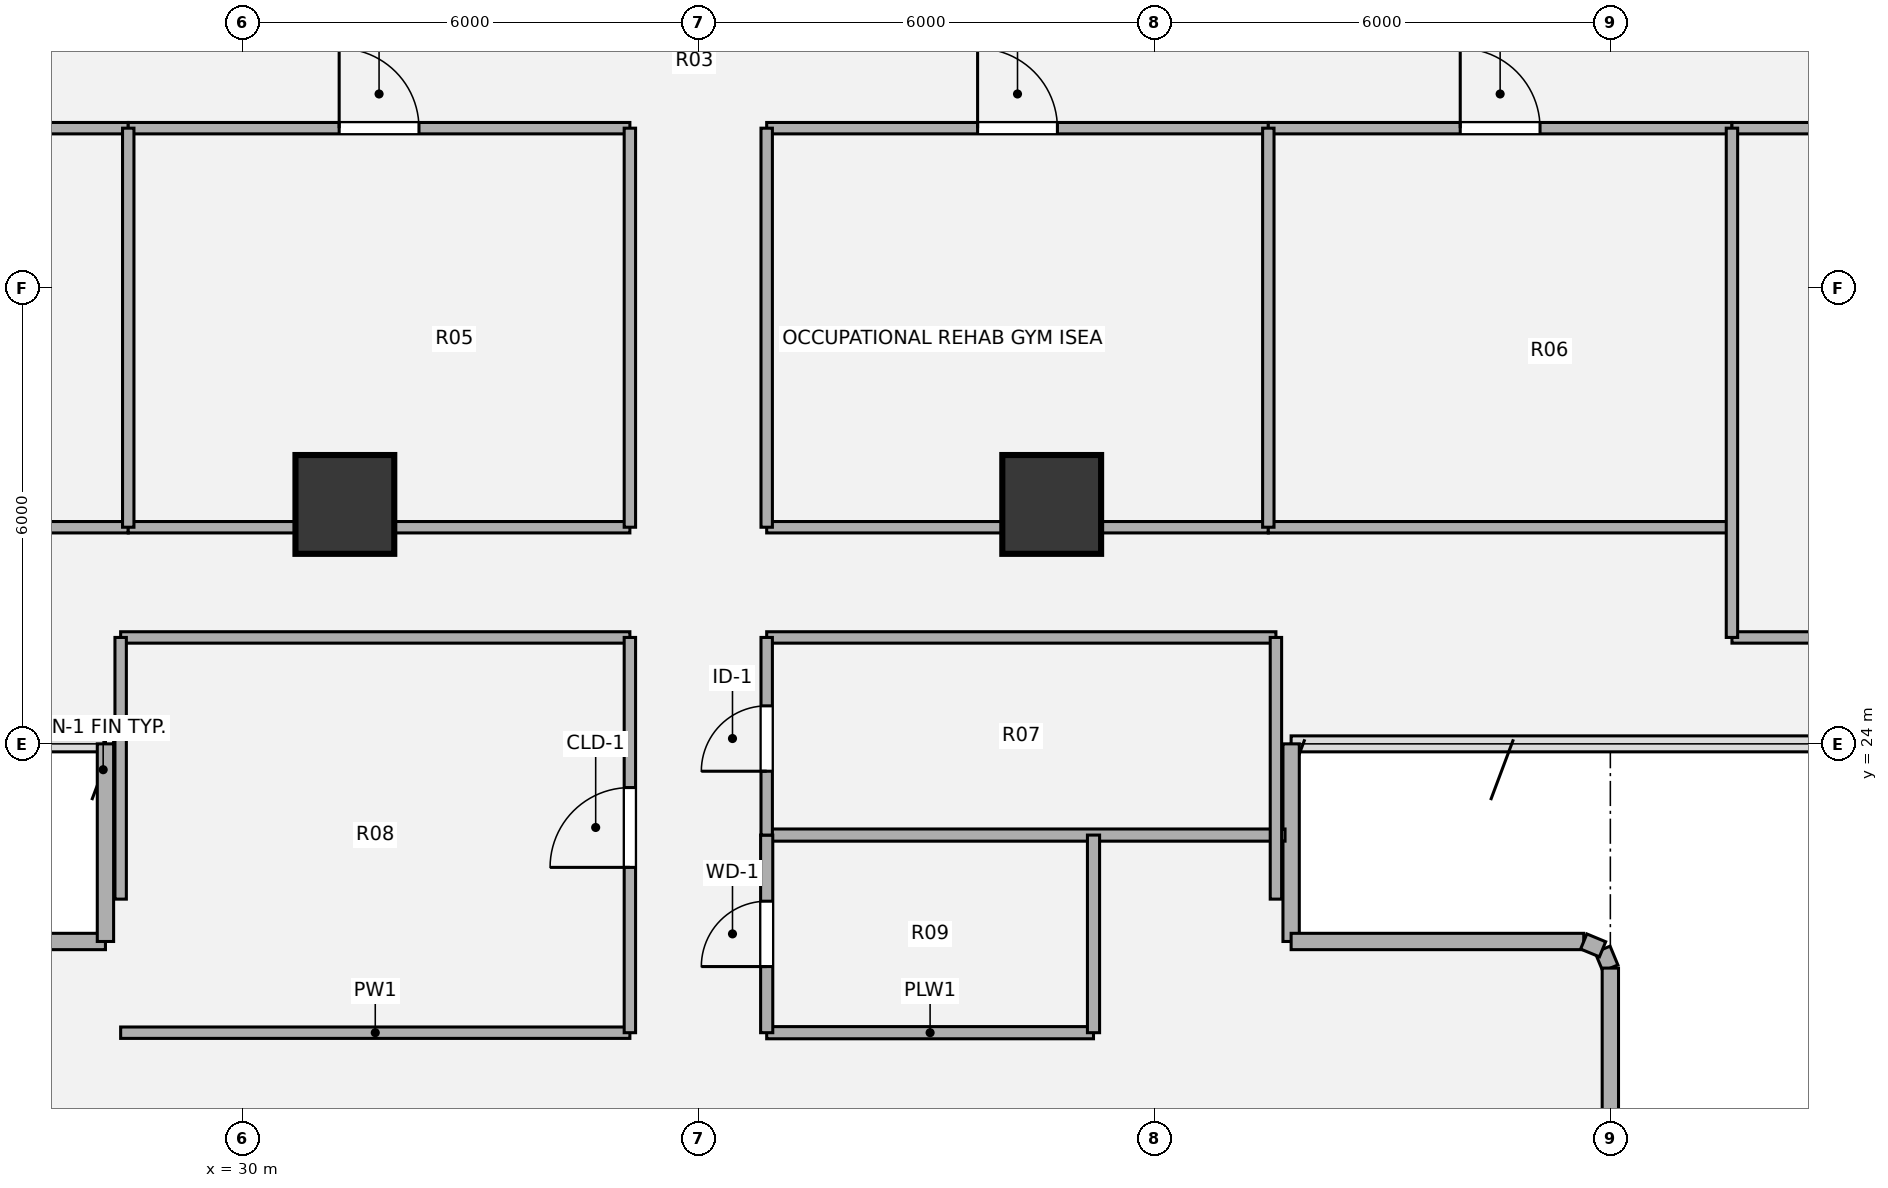
"""IFC4 building model, lengths in metres.
Left out: names, types, materials, properties, quantities, classifications, styles, units other than length and angle.
Written with IfcOpenShell. Run it as: python <this file> out.ifc"""

import sys

from ifc_helpers import new_model, si_unit, direction, frame, frame_2d, origin, origin_2d, place, context, subcontext, project, spatial, rectangle, hollow_circle, extrude, source, transform, mapped, element, fill, save


model = new_model("IFC4")
c1 = context("Model", 3, precision=1e-05, world=origin(), true_north=direction((0.0, 1.0)))
c2 = subcontext(c1, "Body", "Model", "MODEL_VIEW")
j1 = project(units=[si_unit("LENGTHUNIT", "METRE"), si_unit("PLANEANGLEUNIT", "RADIAN")], contexts=[c1])
p1 = place(None, origin())
s1 = spatial("IfcSite", under=j1, at=p1, CompositionType="ELEMENT")
p2 = place(p1, origin())
s2 = spatial("IfcBuilding", under=s1, at=p2, CompositionType="ELEMENT")
p3 = place(p2, frame((0.0, 0.0, 116.28)))
s3 = spatial("IfcBuildingStorey", under=s2, at=p3, CompositionType="ELEMENT", Elevation=116.28)
m1 = source(origin(), c2, "Body", "SweptSolid", [
    extrude(hollow_circle(Radius=0.65, WallThickness=0.045, at=origin_2d()), origin(), (0.0, 0.0, 1.0), 3.78),
])
for number, where, z_axis, x_axis in (
    (1, (31.35, 27.15, 0.0), (0.0, 0.0, 1.0), (1.0, 0.0, 0.0)),
    (2, (40.65, 27.15, 0.0), (0.0, 0.0, 1.0), (1.0, 0.0, 0.0)),
):
    element("IfcColumn", number, at=place(p3, frame(where, z_axis=z_axis, x_axis=x_axis)), inside=s3, PredefinedType="COLUMN", context=c2, shape_type="MappedRepresentation", body=[
        mapped(m1, transform((0.0, 0.0, 0.0), x_axis=(1.0, 0.0, 0.0), y_axis=(0.0, 1.0, 0.0), z_axis=(0.0, 0.0, 1.0), scale=1.0)),
    ])
p4 = place(p3, frame((47.897, 21.298, 0.0), z_axis=(0.0, 0.0, 1.0), x_axis=(0.382673670509, -0.923883575944, 0.0)))
e3 = element("IfcWall", 3, at=p4, inside=s3, PredefinedType="SOLIDWALL", context=c2, shape_type="SweptSolid", body=[
    extrude(rectangle(XDim=0.268, YDim=0.215, at=frame_2d((0.134, 0.0))), origin(), (0.0, 0.0, 1.0), 3.53),
])
p5 = place(p3, frame((48.0, 21.05, 0.0), z_axis=(0.0, 0.0, 1.0), x_axis=(0.0, -1.0, 0.0)))
e4 = element("IfcWall", 4, at=p5, inside=s3, PredefinedType="SOLIDWALL", context=c2, shape_type="SweptSolid", body=[
    extrude(rectangle(XDim=2.62, YDim=0.215, at=frame_2d((1.31, 0.0))), origin(), (0.0, 0.0, 1.0), 3.53),
])
p6 = place(p3, frame((24.35, 21.4, 0.0), z_axis=(0.0, 0.0, 1.0), x_axis=(1.0, 0.0, 0.0)))
e5 = element("IfcWall", 5, at=p6, inside=s3, PredefinedType="SOLIDWALL", context=c2, shape_type="SweptSolid", body=[
    extrude(rectangle(XDim=3.85, YDim=0.215, at=frame_2d((1.925, 0.0))), origin(), (0.0, 0.0, 1.0), 3.53),
])
for number, where, z_axis, x_axis in (
    (6, (28.2, 21.4, 0.0), (0.0, 0.0, 1.0), (0.0, 1.0, 0.0)),
    (7, (43.8, 24.0, 0.0), (0.0, 0.0, 1.0), (0.0, -1.0, 0.0)),
):
    element("IfcWall", number, at=place(p3, frame(where, z_axis=z_axis, x_axis=x_axis)), inside=s3, PredefinedType="SOLIDWALL", context=c2, shape_type="SweptSolid", body=[
        extrude(rectangle(XDim=2.6, YDim=0.215, at=frame_2d((1.3, 0.0))), origin(), (0.0, 0.0, 1.0), 3.53),
    ])
p7 = place(p3, frame((43.8, 21.4, 0.0), z_axis=(0.0, 0.0, 1.0), x_axis=(1.0, 0.0, 0.0)))
e8 = element("IfcWall", 8, at=p7, inside=s3, PredefinedType="SOLIDWALL", context=c2, shape_type="SweptSolid", body=[
    extrude(rectangle(XDim=3.85, YDim=0.215, at=frame_2d((1.925, 0.0))), origin(), (0.0, 0.0, 1.0), 3.53),
])
p8 = place(p3, frame((47.65, 21.4, 0.0), z_axis=(0.0, 0.0, 1.0), x_axis=(0.924205486139, -0.381895560841, 0.0)))
e9 = element("IfcWall", 9, at=p8, inside=s3, PredefinedType="SOLIDWALL", context=c2, shape_type="SweptSolid", body=[
    extrude(rectangle(XDim=0.268, YDim=0.215, at=frame_2d((0.134, 0.0))), origin(), (0.0, 0.0, 1.0), 3.53),
])
p9 = place(p3, frame((28.4, 20.2, 0.0), z_axis=(0.0, 0.0, 1.0), x_axis=(1.0, 0.0, 0.0)))
e10 = element("IfcWall", 10, at=p9, inside=s3, PredefinedType="PARTITIONING", context=c2, shape_type="SweptSolid", body=[
    extrude(rectangle(XDim=6.7, YDim=0.15, at=frame_2d((3.35, 0.0))), origin(), (0.0, 0.0, 1.0), 3.5),
])
p10 = place(p3, frame((36.9, 20.2, 0.0), z_axis=(0.0, 0.0, 1.0), x_axis=(1.0, 0.0, 0.0)))
e11 = element("IfcWall", 11, at=p10, inside=s3, PredefinedType="PLUMBINGWALL", context=c2, shape_type="SweptSolid", body=[
    extrude(rectangle(XDim=4.3, YDim=0.16, at=frame_2d((2.15, 0.0))), origin(), (0.0, 0.0, 1.0), 3.5),
])
p11 = place(p3, frame((36.9, 22.8, 0.0), z_axis=(0.0, 0.0, 1.0), x_axis=(1.0, 0.0, 0.0)))
e12 = element("IfcWall", 12, at=p11, inside=s3, PredefinedType="PLUMBINGWALL", context=c2, shape_type="SweptSolid", body=[
    extrude(rectangle(XDim=6.82, YDim=0.16, at=frame_2d((3.41, 0.0))), origin(), (0.0, 0.0, 1.0), 3.5),
])
for number, where, z_axis, x_axis in (
    (13, (28.4, 25.4, 0.0), (0.0, 0.0, 1.0), (1.0, 0.0, 0.0)),
    (14, (36.9, 25.4, 0.0), (0.0, 0.0, 1.0), (1.0, 0.0, 0.0)),
):
    element("IfcWall", number, at=place(p3, frame(where, z_axis=z_axis, x_axis=x_axis)), inside=s3, PredefinedType="PARTITIONING", context=c2, shape_type="SweptSolid", body=[
        extrude(rectangle(XDim=6.7, YDim=0.15, at=frame_2d((3.35, 0.0))), origin(), (0.0, 0.0, 1.0), 3.5),
    ])
p12 = place(p3, frame((49.6, 25.4, 0.0), z_axis=(0.0, 0.0, 1.0), x_axis=(1.0, 0.0, 0.0)))
e15 = element("IfcWall", 15, at=p12, inside=s3, PredefinedType="PARTITIONING", context=c2, shape_type="SweptSolid", body=[
    extrude(rectangle(XDim=7.776, YDim=0.15, at=frame_2d((3.888, 0.0))), origin(), (0.0, 0.0, 1.0), 3.5),
])
p13 = place(p3, frame((22.4, 26.85, 0.0), z_axis=(0.0, 0.0, 1.0), x_axis=(1.0, 0.0, 0.0)))
e16 = element("IfcWall", 16, at=p13, inside=s3, PredefinedType="PARTITIONING", context=c2, shape_type="SweptSolid", body=[
    extrude(rectangle(XDim=6.1, YDim=0.15, at=frame_2d((3.05, 0.0))), origin(), (0.0, 0.0, 1.0), 3.055),
])
for number, where, z_axis, x_axis in (
    (17, (28.5, 26.85, 0.0), (0.0, 0.0, 1.0), (1.0, 0.0, 0.0)),
    (18, (36.9, 26.85, 0.0), (0.0, 0.0, 1.0), (1.0, 0.0, 0.0)),
):
    element("IfcWall", number, at=place(p3, frame(where, z_axis=z_axis, x_axis=x_axis)), inside=s3, PredefinedType="PARTITIONING", context=c2, shape_type="SweptSolid", body=[
        extrude(rectangle(XDim=6.6, YDim=0.15, at=frame_2d((3.3, 0.0))), origin(), (0.0, 0.0, 1.0), 2.903),
    ])
p14 = place(p3, frame((43.5, 26.85, 0.0), z_axis=(0.0, 0.0, 1.0), x_axis=(1.0, 0.0, 0.0)))
e19 = element("IfcWall", 19, at=p14, inside=s3, PredefinedType="PARTITIONING", context=c2, shape_type="SweptSolid", body=[
    extrude(rectangle(XDim=6.1, YDim=0.15, at=frame_2d((3.05, 0.0))), origin(), (0.0, 0.0, 1.0), 3.055),
])
p15 = place(p3, frame((22.4, 32.1, 0.0), z_axis=(0.0, 0.0, 1.0), x_axis=(1.0, 0.0, 0.0)))
e20 = element("IfcWall", 20, at=p15, inside=s3, PredefinedType="PARTITIONING", context=c2, shape_type="SweptSolid", body=[
    extrude(rectangle(XDim=6.1, YDim=0.15, at=frame_2d((3.05, 0.0))), origin(), (0.0, 0.0, 1.0), 2.982),
])
p16 = place(p15, frame((2.525, 0.0, 0.0)))
e21 = element("IfcOpeningElement", 21, at=p16, cuts=e20, PredefinedType="OPENING", context=c2, shape_type="SweptSolid", body=[
    extrude(rectangle(XDim=1.05, YDim=2.1, at=origin_2d()), frame((0.525, 0.085, 1.05), z_axis=(0.0, -1.0, 0.0), x_axis=(1.0, 0.0, 0.0)), (0.0, 0.0, 1.0), 0.17),
])
p17 = place(p3, frame((28.5, 32.1, 0.0), z_axis=(0.0, 0.0, 1.0), x_axis=(1.0, 0.0, 0.0)))
e22 = element("IfcWall", 22, at=p17, inside=s3, PredefinedType="PARTITIONING", context=c2, shape_type="SweptSolid", body=[
    extrude(rectangle(XDim=6.6, YDim=0.15, at=frame_2d((3.3, 0.0))), origin(), (0.0, 0.0, 1.0), 2.982),
])
p18 = place(p17, frame((2.775, 0.0, 0.0)))
e23 = element("IfcOpeningElement", 23, at=p18, cuts=e22, PredefinedType="OPENING", context=c2, shape_type="SweptSolid", body=[
    extrude(rectangle(XDim=1.05, YDim=2.1, at=origin_2d()), frame((0.525, 0.085, 1.05), z_axis=(0.0, -1.0, 0.0), x_axis=(1.0, 0.0, 0.0)), (0.0, 0.0, 1.0), 0.17),
])
p19 = place(p3, frame((36.9, 32.1, 0.0), z_axis=(0.0, 0.0, 1.0), x_axis=(1.0, 0.0, 0.0)))
e24 = element("IfcWall", 24, at=p19, inside=s3, PredefinedType="PARTITIONING", context=c2, shape_type="SweptSolid", body=[
    extrude(rectangle(XDim=6.6, YDim=0.15, at=frame_2d((3.3, 0.0))), origin(), (0.0, 0.0, 1.0), 2.982),
])
p20 = place(p19, frame((2.775, 0.0, 0.0)))
e25 = element("IfcOpeningElement", 25, at=p20, cuts=e24, PredefinedType="OPENING", context=c2, shape_type="SweptSolid", body=[
    extrude(rectangle(XDim=1.05, YDim=2.1, at=origin_2d()), frame((0.525, 0.085, 1.05), z_axis=(0.0, -1.0, 0.0), x_axis=(1.0, 0.0, 0.0)), (0.0, 0.0, 1.0), 0.17),
])
p21 = place(p3, frame((43.5, 32.1, 0.0), z_axis=(0.0, 0.0, 1.0), x_axis=(1.0, 0.0, 0.0)))
e26 = element("IfcWall", 26, at=p21, inside=s3, PredefinedType="PARTITIONING", context=c2, shape_type="SweptSolid", body=[
    extrude(rectangle(XDim=6.1, YDim=0.15, at=frame_2d((3.05, 0.0))), origin(), (0.0, 0.0, 1.0), 2.982),
])
p22 = place(p21, frame((2.525, 0.0, 0.0)))
e27 = element("IfcOpeningElement", 27, at=p22, cuts=e26, PredefinedType="OPENING", context=c2, shape_type="SweptSolid", body=[
    extrude(rectangle(XDim=1.05, YDim=2.1, at=origin_2d()), frame((0.525, 0.085, 1.05), z_axis=(0.0, -1.0, 0.0), x_axis=(1.0, 0.0, 0.0)), (0.0, 0.0, 1.0), 0.17),
])
p23 = place(p3, frame((49.6, 32.1, 0.0), z_axis=(0.0, 0.0, 1.0), x_axis=(1.0, 0.0, 0.0)))
e28 = element("IfcWall", 28, at=p23, inside=s3, PredefinedType="PARTITIONING", context=c2, shape_type="SweptSolid", body=[
    extrude(rectangle(XDim=8.42, YDim=0.15, at=frame_2d((4.21, 0.0))), origin(), (0.0, 0.0, 1.0), 2.982),
])
p24 = place(p23, frame((1.375, 0.0, 0.0)))
e29 = element("IfcOpeningElement", 29, at=p24, cuts=e28, PredefinedType="OPENING", context=c2, shape_type="SweptSolid", body=[
    extrude(rectangle(XDim=1.05, YDim=2.1, at=origin_2d()), frame((0.525, 0.085, 1.05), z_axis=(0.0, -1.0, 0.0), x_axis=(1.0, 0.0, 0.0)), (0.0, 0.0, 1.0), 0.17),
])
p25 = place(p3, frame((28.4, 21.957, 0.0), z_axis=(0.0, 0.0, 1.0), x_axis=(0.0, 1.0, 0.0)))
e30 = element("IfcWall", 30, at=p25, inside=s3, PredefinedType="PARTITIONING", context=c2, shape_type="SweptSolid", body=[
    extrude(rectangle(XDim=3.443, YDim=0.15, at=frame_2d((1.721, 0.0))), origin(), (0.0, 0.0, 1.0), 3.5),
])
p26 = place(p3, frame((28.5, 26.85, 0.0), z_axis=(0.0, 0.0, 1.0), x_axis=(0.0, 1.0, 0.0)))
e31 = element("IfcWall", 31, at=p26, inside=s3, PredefinedType="PARTITIONING", context=c2, shape_type="SweptSolid", body=[
    extrude(rectangle(XDim=5.25, YDim=0.15, at=frame_2d((2.625, 0.0))), origin(), (0.0, 0.0, 1.0), 3.5),
])
p27 = place(p3, frame((35.1, 20.2, 0.0), z_axis=(0.0, 0.0, 1.0), x_axis=(0.0, 1.0, 0.0)))
e32 = element("IfcWall", 32, at=p27, inside=s3, PredefinedType="PARTITIONING", context=c2, shape_type="SweptSolid", body=[
    extrude(rectangle(XDim=5.2, YDim=0.15, at=frame_2d((2.6, 0.0))), origin(), (0.0, 0.0, 1.0), 3.5),
])
p28 = place(p27, frame((2.175, 0.0, 0.0)))
e33 = element("IfcOpeningElement", 33, at=p28, cuts=e32, PredefinedType="OPENING", context=c2, shape_type="SweptSolid", body=[
    extrude(rectangle(XDim=1.05, YDim=2.1, at=origin_2d()), frame((0.525, 0.085, 1.05), z_axis=(0.0, -1.0, 0.0), x_axis=(1.0, 0.0, 0.0)), (0.0, 0.0, 1.0), 0.17),
])
p29 = place(p3, frame((35.1, 26.85, 0.0), z_axis=(0.0, 0.0, 1.0), x_axis=(0.0, 1.0, 0.0)))
e34 = element("IfcWall", 34, at=p29, inside=s3, PredefinedType="PARTITIONING", context=c2, shape_type="SweptSolid", body=[
    extrude(rectangle(XDim=5.25, YDim=0.15, at=frame_2d((2.625, 0.0))), origin(), (0.0, 0.0, 1.0), 3.5),
])
p30 = place(p3, frame((36.9, 20.2, 0.0), z_axis=(0.0, 0.0, 1.0), x_axis=(0.0, 1.0, 0.0)))
e35 = element("IfcWall", 35, at=p30, inside=s3, PredefinedType="PLUMBINGWALL", context=c2, shape_type="SweptSolid", body=[
    extrude(rectangle(XDim=2.6, YDim=0.16, at=frame_2d((1.3, 0.0))), origin(), (0.0, 0.0, 1.0), 3.5),
])
p31 = place(p30, frame((0.87, 0.0, 0.0)))
e36 = element("IfcOpeningElement", 36, at=p31, cuts=e35, PredefinedType="OPENING", context=c2, shape_type="SweptSolid", body=[
    extrude(rectangle(XDim=0.86, YDim=2.1, at=origin_2d()), frame((0.43, 0.09, 1.05), z_axis=(0.0, -1.0, 0.0), x_axis=(1.0, 0.0, 0.0)), (0.0, 0.0, 1.0), 0.18),
])
p32 = place(p3, frame((36.9, 22.8, 0.0), z_axis=(0.0, 0.0, 1.0), x_axis=(0.0, 1.0, 0.0)))
e37 = element("IfcWall", 37, at=p32, inside=s3, PredefinedType="PARTITIONING", context=c2, shape_type="SweptSolid", body=[
    extrude(rectangle(XDim=2.6, YDim=0.15, at=frame_2d((1.3, 0.0))), origin(), (0.0, 0.0, 1.0), 3.5),
])
p33 = place(p32, frame((0.84, 0.0, 0.0)))
e38 = element("IfcOpeningElement", 38, at=p33, cuts=e37, PredefinedType="OPENING", context=c2, shape_type="SweptSolid", body=[
    extrude(rectangle(XDim=0.86, YDim=2.1, at=origin_2d()), frame((0.43, 0.085, 1.05), z_axis=(0.0, -1.0, 0.0), x_axis=(1.0, 0.0, 0.0)), (0.0, 0.0, 1.0), 0.17),
])
p34 = place(p3, frame((36.9, 26.85, 0.0), z_axis=(0.0, 0.0, 1.0), x_axis=(0.0, 1.0, 0.0)))
e39 = element("IfcWall", 39, at=p34, inside=s3, PredefinedType="PARTITIONING", context=c2, shape_type="SweptSolid", body=[
    extrude(rectangle(XDim=5.25, YDim=0.15, at=frame_2d((2.625, 0.0))), origin(), (0.0, 0.0, 1.0), 3.5),
])
p35 = place(p3, frame((41.2, 20.2, 0.0), z_axis=(0.0, 0.0, 1.0), x_axis=(0.0, 1.0, 0.0)))
e40 = element("IfcWall", 40, at=p35, inside=s3, PredefinedType="PLUMBINGWALL", context=c2, shape_type="SweptSolid", body=[
    extrude(rectangle(XDim=2.6, YDim=0.16, at=frame_2d((1.3, 0.0))), origin(), (0.0, 0.0, 1.0), 2.815),
])
p36 = place(p3, frame((43.5, 26.85, 0.0), z_axis=(0.0, 0.0, 1.0), x_axis=(0.0, 1.0, 0.0)))
e41 = element("IfcWall", 41, at=p36, inside=s3, PredefinedType="PARTITIONING", context=c2, shape_type="SweptSolid", body=[
    extrude(rectangle(XDim=5.25, YDim=0.15, at=frame_2d((2.625, 0.0))), origin(), (0.0, 0.0, 1.0), 3.5),
])
p37 = place(p3, frame((43.6, 21.958, 0.0), z_axis=(0.0, 0.0, 1.0), x_axis=(0.0, 1.0, 0.0)))
e42 = element("IfcWall", 42, at=p37, inside=s3, PredefinedType="PARTITIONING", context=c2, shape_type="SweptSolid", body=[
    extrude(rectangle(XDim=3.442, YDim=0.15, at=frame_2d((1.721, 0.0))), origin(), (0.0, 0.0, 1.0), 3.5),
])
p38 = place(p3, frame((49.6, 25.4, 0.0), z_axis=(0.0, 0.0, 1.0), x_axis=(0.0, 1.0, 0.0)))
e43 = element("IfcWall", 43, at=p38, inside=s3, PredefinedType="PARTITIONING", context=c2, shape_type="SweptSolid", body=[
    extrude(rectangle(XDim=6.7, YDim=0.15, at=frame_2d((3.35, 0.0))), origin(), (0.0, 0.0, 1.0), 3.5),
])
m2 = source(origin(), c2, "Body", "SweptSolid", [
    extrude(rectangle(XDim=1.05, YDim=2.1, at=origin_2d()), frame((0.525, 0.025, 1.05), z_axis=(0.0, -1.0, 0.0), x_axis=(1.0, 0.0, 0.0)), (0.0, 0.0, 1.0), 0.05),
])
p39 = place(p18, origin())
e44 = element("IfcDoor", 44, at=p39, inside=s3, OperationType="SINGLE_SWING_LEFT", PredefinedType="DOOR", context=c2, shape_type="MappedRepresentation", body=[
    mapped(m2, transform((0.0, 0.0, 0.0), x_axis=(1.0, 0.0, 0.0), y_axis=(0.0, 1.0, 0.0), z_axis=(0.0, 0.0, 1.0), scale=1.0)),
])
fill(e23, e44)
p40 = place(p20, origin())
e45 = element("IfcDoor", 45, at=p40, inside=s3, OperationType="SINGLE_SWING_LEFT", PredefinedType="DOOR", context=c2, shape_type="MappedRepresentation", body=[
    mapped(m2, transform((0.0, 0.0, 0.0), x_axis=(1.0, 0.0, 0.0), y_axis=(0.0, 1.0, 0.0), z_axis=(0.0, 0.0, 1.0), scale=1.0)),
])
fill(e25, e45)
p41 = place(p22, origin())
e46 = element("IfcDoor", 46, at=p41, inside=s3, OperationType="SINGLE_SWING_LEFT", PredefinedType="DOOR", context=c2, shape_type="MappedRepresentation", body=[
    mapped(m2, transform((0.0, 0.0, 0.0), x_axis=(1.0, 0.0, 0.0), y_axis=(0.0, 1.0, 0.0), z_axis=(0.0, 0.0, 1.0), scale=1.0)),
])
fill(e27, e46)
p42 = place(p28, origin())
e47 = element("IfcDoor", 47, at=p42, inside=s3, OperationType="SINGLE_SWING_LEFT", PredefinedType="DOOR", context=c2, shape_type="MappedRepresentation", body=[
    mapped(m2, transform((0.0, 0.0, 0.0), x_axis=(1.0, 0.0, 0.0), y_axis=(0.0, 1.0, 0.0), z_axis=(0.0, 0.0, 1.0), scale=1.0)),
])
fill(e33, e47)
m3 = source(origin(), c2, "Body", "SweptSolid", [
    extrude(rectangle(XDim=0.86, YDim=2.1, at=origin_2d()), frame((0.43, 0.025, 1.05), z_axis=(0.0, -1.0, 0.0), x_axis=(1.0, 0.0, 0.0)), (0.0, 0.0, 1.0), 0.05),
])
p43 = place(p31, origin())
e48 = element("IfcDoor", 48, at=p43, inside=s3, OperationType="SINGLE_SWING_LEFT", PredefinedType="DOOR", context=c2, shape_type="MappedRepresentation", body=[
    mapped(m3, transform((0.0, 0.0, 0.0), x_axis=(1.0, 0.0, 0.0), y_axis=(0.0, 1.0, 0.0), z_axis=(0.0, 0.0, 1.0), scale=1.0)),
])
fill(e36, e48)
m4 = source(origin(), c2, "Body", "SweptSolid", [
    extrude(rectangle(XDim=0.86, YDim=2.1, at=origin_2d()), frame((0.43, 0.025, 1.05), z_axis=(0.0, -1.0, 0.0), x_axis=(1.0, 0.0, 0.0)), (0.0, 0.0, 1.0), 0.05),
])
p44 = place(p33, origin())
e49 = element("IfcDoor", 49, at=p44, inside=s3, OperationType="SINGLE_SWING_LEFT", PredefinedType="DOOR", context=c2, shape_type="MappedRepresentation", body=[
    mapped(m4, transform((0.0, 0.0, 0.0), x_axis=(1.0, 0.0, 0.0), y_axis=(0.0, 1.0, 0.0), z_axis=(0.0, 0.0, 1.0), scale=1.0)),
])
fill(e38, e49)
save(model, sys.argv[1])
